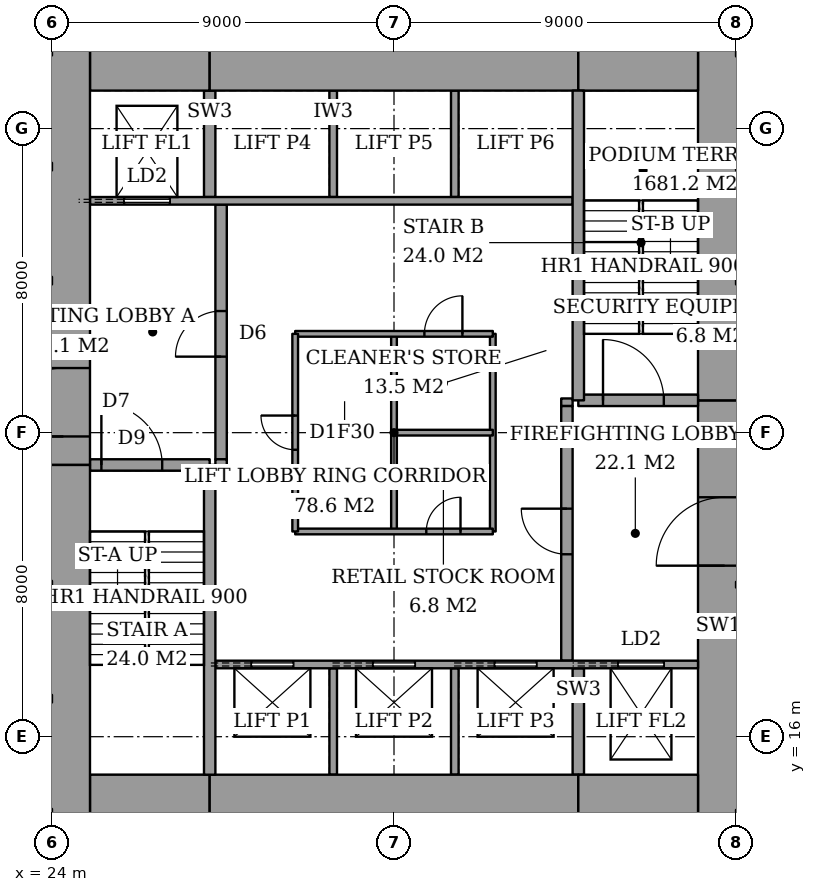
"""IFC4 building model, lengths in metres.
Left out: names, types, materials, properties, quantities, classifications, styles, units other than length and angle.
Written with IfcOpenShell. Run it as: python <this file> out.ifc"""

import sys

from ifc_helpers import new_model, si_unit, direction, frame, frame_2d, origin, place, context, subcontext, project, spatial, rectangle, extrude, element, fill, save


model = new_model("IFC4")
c1 = context("Model", 3, precision=1e-05, world=origin(), true_north=direction((0.0, 1.0)))
c2 = subcontext(c1, "Body", "Model", "MODEL_VIEW")
j1 = project(units=[si_unit("LENGTHUNIT", "METRE"), si_unit("PLANEANGLEUNIT", "RADIAN")], contexts=[c1])
p1 = place(None, origin())
s1 = spatial("IfcSite", under=j1, at=p1, CompositionType="ELEMENT")
p2 = place(p1, origin())
s2 = spatial("IfcBuilding", under=s1, at=p2, CompositionType="ELEMENT")
p3 = place(p2, frame((0.0, 0.0, 11.0)))
s3 = spatial("IfcBuildingStorey", under=s2, at=p3, CompositionType="ELEMENT", Elevation=11.0)
p4 = place(p3, frame((25.0, 14.0, 0.0), z_axis=(0.0, 0.0, 1.0), x_axis=(1.0, 0.0, 0.0)))
e1 = element("IfcWall", 1, at=p4, inside=s3, PredefinedType="SHEAR", context=c2, shape_type="SweptSolid", body=[
    extrude(rectangle(XDim=3.15, YDim=2.0, at=frame_2d((1.575, 0.0))), origin(), (0.0, 0.0, 1.0), 5.0),
])
p5 = place(p3, frame((28.15, 14.0, 0.0), z_axis=(0.0, 0.0, 1.0), x_axis=(1.0, 0.0, 0.0)))
e2 = element("IfcWall", 2, at=p5, inside=s3, PredefinedType="SHEAR", context=c2, shape_type="SweptSolid", body=[
    extrude(rectangle(XDim=9.7, YDim=2.0, at=frame_2d((4.85, 0.0))), origin(), (0.0, 0.0, 1.0), 5.0),
])
for number, where, z_axis, x_axis in (
    (3, (37.85, 14.0, 0.0), (0.0, 0.0, 1.0), (1.0, 0.0, 0.0)),
    (4, (25.0, 34.0, 0.0), (0.0, 0.0, 1.0), (1.0, 0.0, 0.0)),
):
    element("IfcWall", number, at=place(p3, frame(where, z_axis=z_axis, x_axis=x_axis)), inside=s3, PredefinedType="SHEAR", context=c2, shape_type="SweptSolid", body=[
        extrude(rectangle(XDim=3.15, YDim=2.0, at=frame_2d((1.575, 0.0))), origin(), (0.0, 0.0, 1.0), 5.0),
    ])
p6 = place(p3, frame((28.15, 34.0, 0.0), z_axis=(0.0, 0.0, 1.0), x_axis=(1.0, 0.0, 0.0)))
e5 = element("IfcWall", 5, at=p6, inside=s3, PredefinedType="SHEAR", context=c2, shape_type="SweptSolid", body=[
    extrude(rectangle(XDim=9.7, YDim=2.0, at=frame_2d((4.85, 0.0))), origin(), (0.0, 0.0, 1.0), 5.0),
])
p7 = place(p3, frame((37.85, 34.0, 0.0), z_axis=(0.0, 0.0, 1.0), x_axis=(1.0, 0.0, 0.0)))
e6 = element("IfcWall", 6, at=p7, inside=s3, PredefinedType="SHEAR", context=c2, shape_type="SweptSolid", body=[
    extrude(rectangle(XDim=3.15, YDim=2.0, at=frame_2d((1.575, 0.0))), origin(), (0.0, 0.0, 1.0), 5.0),
])
p8 = place(p3, frame((24.3, 13.0, 0.0), z_axis=(0.0, 0.0, 1.0), x_axis=(0.0, 1.0, 0.0)))
e7 = element("IfcWall", 7, at=p8, inside=s3, PredefinedType="SHEAR", context=c2, shape_type="SweptSolid", body=[
    extrude(rectangle(XDim=10.15, YDim=1.4, at=frame_2d((5.075, 0.0))), origin(), (0.0, 0.0, 1.0), 5.0),
])
p9 = place(p3, frame((24.3, 23.15, 0.0), z_axis=(0.0, 0.0, 1.0), x_axis=(0.0, 1.0, 0.0)))
e8 = element("IfcWall", 8, at=p9, inside=s3, PredefinedType="SHEAR", context=c2, shape_type="SweptSolid", body=[
    extrude(rectangle(XDim=11.85, YDim=1.4, at=frame_2d((5.925, 0.0))), origin(), (0.0, 0.0, 1.0), 5.0),
])
p10 = place(p9, frame((0.75, 0.0, 0.0)))
e9 = element("IfcOpeningElement", 9, at=p10, cuts=e8, PredefinedType="OPENING", context=c2, shape_type="SweptSolid", body=[
    extrude(rectangle(XDim=1.8, YDim=2.4, at=frame_2d((0.9, 1.2))), frame((0.0, 0.71, 0.0), z_axis=(0.0, -1.0, 0.0), x_axis=(1.0, 0.0, 0.0)), (0.0, 0.0, 1.0), 1.42),
])
p11 = place(p3, frame((41.7, 13.0, 0.0), z_axis=(0.0, 0.0, 1.0), x_axis=(0.0, 1.0, 0.0)))
e10 = element("IfcWall", 10, at=p11, inside=s3, PredefinedType="SHEAR", context=c2, shape_type="SweptSolid", body=[
    extrude(rectangle(XDim=11.85, YDim=1.4, at=frame_2d((5.925, 0.0))), origin(), (0.0, 0.0, 1.0), 5.0),
])
p12 = place(p11, frame((7.5, 0.0, 0.0)))
e11 = element("IfcOpeningElement", 11, at=p12, cuts=e10, PredefinedType="OPENING", context=c2, shape_type="SweptSolid", body=[
    extrude(rectangle(XDim=1.8, YDim=2.4, at=frame_2d((0.9, 1.2))), frame((0.0, 0.71, 0.0), z_axis=(0.0, -1.0, 0.0), x_axis=(1.0, 0.0, 0.0)), (0.0, 0.0, 1.0), 1.42),
])
p13 = place(p3, frame((41.7, 24.85, 0.0), z_axis=(0.0, 0.0, 1.0), x_axis=(0.0, 1.0, 0.0)))
e12 = element("IfcWall", 12, at=p13, inside=s3, PredefinedType="SHEAR", context=c2, shape_type="SweptSolid", body=[
    extrude(rectangle(XDim=10.15, YDim=1.4, at=frame_2d((5.075, 0.0))), origin(), (0.0, 0.0, 1.0), 5.0),
])
p14 = place(p3, frame((28.15, 15.0, 0.0), z_axis=(0.0, 0.0, 1.0), x_axis=(0.0, 1.0, 0.0)))
e13 = element("IfcWall", 13, at=p14, inside=s3, PredefinedType="SHEAR", context=c2, shape_type="SweptSolid", body=[
    extrude(rectangle(XDim=8.15, YDim=0.3, at=frame_2d((4.075, 0.0))), origin(), (0.0, 0.0, 1.0), 5.0),
])
p15 = place(p3, frame((25.0, 23.15, 0.0), z_axis=(0.0, 0.0, 1.0), x_axis=(1.0, 0.0, 0.0)))
e14 = element("IfcWall", 14, at=p15, inside=s3, PredefinedType="SHEAR", context=c2, shape_type="SweptSolid", body=[
    extrude(rectangle(XDim=3.15, YDim=0.3, at=frame_2d((1.575, 0.0))), origin(), (0.0, 0.0, 1.0), 5.0),
])
p16 = place(p15, frame((0.3, 0.0, 0.0)))
e15 = element("IfcOpeningElement", 15, at=p16, cuts=e14, PredefinedType="OPENING", context=c2, shape_type="SweptSolid", body=[
    extrude(rectangle(XDim=1.6, YDim=2.1, at=frame_2d((0.8, 1.05))), frame((0.0, 0.16, 0.0), z_axis=(0.0, -1.0, 0.0), x_axis=(1.0, 0.0, 0.0)), (0.0, 0.0, 1.0), 0.32),
])
p17 = place(p3, frame((37.85, 24.85, 0.0), z_axis=(0.0, 0.0, 1.0), x_axis=(0.0, 1.0, 0.0)))
e16 = element("IfcWall", 16, at=p17, inside=s3, PredefinedType="SHEAR", context=c2, shape_type="SweptSolid", body=[
    extrude(rectangle(XDim=8.15, YDim=0.3, at=frame_2d((4.075, 0.0))), origin(), (0.0, 0.0, 1.0), 5.0),
])
p18 = place(p3, frame((37.85, 24.85, 0.0), z_axis=(0.0, 0.0, 1.0), x_axis=(1.0, 0.0, 0.0)))
e17 = element("IfcWall", 17, at=p18, inside=s3, PredefinedType="SHEAR", context=c2, shape_type="SweptSolid", body=[
    extrude(rectangle(XDim=3.15, YDim=0.3, at=frame_2d((1.575, 0.0))), origin(), (0.0, 0.0, 1.0), 5.0),
])
p19 = place(p18, frame((0.65, 0.0, 0.0)))
e18 = element("IfcOpeningElement", 18, at=p19, cuts=e17, PredefinedType="OPENING", context=c2, shape_type="SweptSolid", body=[
    extrude(rectangle(XDim=1.6, YDim=2.1, at=frame_2d((0.8, 1.05))), frame((0.0, 0.16, 0.0), z_axis=(0.0, -1.0, 0.0), x_axis=(1.0, 0.0, 0.0)), (0.0, 0.0, 1.0), 0.32),
])
p20 = place(p3, frame((28.45, 23.3, 0.0), z_axis=(0.0, 0.0, 1.0), x_axis=(0.0, 1.0, 0.0)))
e19 = element("IfcWall", 19, at=p20, inside=s3, PredefinedType="PARTITIONING", context=c2, shape_type="SweptSolid", body=[
    extrude(rectangle(XDim=6.7, YDim=0.3, at=frame_2d((3.35, 0.0))), origin(), (0.0, 0.0, 1.0), 5.0),
])
p21 = place(p20, frame((2.7, 0.0, 0.0)))
e20 = element("IfcOpeningElement", 20, at=p21, cuts=e19, PredefinedType="OPENING", context=c2, shape_type="SweptSolid", body=[
    extrude(rectangle(XDim=1.2, YDim=2.1, at=frame_2d((0.6, 1.05))), frame((0.0, 0.16, 0.0), z_axis=(0.0, -1.0, 0.0), x_axis=(1.0, 0.0, 0.0)), (0.0, 0.0, 1.0), 0.32),
])
p22 = place(p3, frame((37.55, 18.0, 0.0), z_axis=(0.0, 0.0, 1.0), x_axis=(0.0, 1.0, 0.0)))
e21 = element("IfcWall", 21, at=p22, inside=s3, PredefinedType="PARTITIONING", context=c2, shape_type="SweptSolid", body=[
    extrude(rectangle(XDim=6.7, YDim=0.3, at=frame_2d((3.35, 0.0))), origin(), (0.0, 0.0, 1.0), 5.0),
])
p23 = place(p22, frame((2.8, 0.0, 0.0)))
e22 = element("IfcOpeningElement", 22, at=p23, cuts=e21, PredefinedType="OPENING", context=c2, shape_type="SweptSolid", body=[
    extrude(rectangle(XDim=1.2, YDim=2.1, at=frame_2d((0.6, 1.05))), frame((0.0, 0.16, 0.0), z_axis=(0.0, -1.0, 0.0), x_axis=(1.0, 0.0, 0.0)), (0.0, 0.0, 1.0), 0.32),
])
p24 = place(p3, frame((28.3, 17.9, 0.0), z_axis=(0.0, 0.0, 1.0), x_axis=(1.0, 0.0, 0.0)))
e23 = element("IfcWall", 23, at=p24, inside=s3, PredefinedType="PARTITIONING", context=c2, shape_type="SweptSolid", body=[
    extrude(rectangle(XDim=12.7, YDim=0.2, at=frame_2d((6.35, 0.0))), origin(), (0.0, 0.0, 1.0), 5.0),
])
p25 = place(p24, frame((0.95, 0.0, 0.0)))
e24 = element("IfcOpeningElement", 24, at=p25, cuts=e23, PredefinedType="OPENING", context=c2, shape_type="SweptSolid", body=[
    extrude(rectangle(XDim=1.1, YDim=2.1, at=frame_2d((0.55, 1.05))), frame((0.0, 0.11, 0.0), z_axis=(0.0, -1.0, 0.0), x_axis=(1.0, 0.0, 0.0)), (0.0, 0.0, 1.0), 0.22),
])
p26 = place(p24, frame((4.15, 0.0, 0.0)))
e25 = element("IfcOpeningElement", 25, at=p26, cuts=e23, PredefinedType="OPENING", context=c2, shape_type="SweptSolid", body=[
    extrude(rectangle(XDim=1.1, YDim=2.1, at=frame_2d((0.55, 1.05))), frame((0.0, 0.11, 0.0), z_axis=(0.0, -1.0, 0.0), x_axis=(1.0, 0.0, 0.0)), (0.0, 0.0, 1.0), 0.22),
])
p27 = place(p24, frame((7.35, 0.0, 0.0)))
e26 = element("IfcOpeningElement", 26, at=p27, cuts=e23, PredefinedType="OPENING", context=c2, shape_type="SweptSolid", body=[
    extrude(rectangle(XDim=1.1, YDim=2.1, at=frame_2d((0.55, 1.05))), frame((0.0, 0.11, 0.0), z_axis=(0.0, -1.0, 0.0), x_axis=(1.0, 0.0, 0.0)), (0.0, 0.0, 1.0), 0.22),
])
p28 = place(p24, frame((10.6, 0.0, 0.0)))
e27 = element("IfcOpeningElement", 27, at=p28, cuts=e23, PredefinedType="OPENING", context=c2, shape_type="SweptSolid", body=[
    extrude(rectangle(XDim=1.2, YDim=2.1, at=frame_2d((0.6, 1.05))), frame((0.0, 0.11, 0.0), z_axis=(0.0, -1.0, 0.0), x_axis=(1.0, 0.0, 0.0)), (0.0, 0.0, 1.0), 0.22),
])
p29 = place(p3, frame((25.0, 30.1, 0.0), z_axis=(0.0, 0.0, 1.0), x_axis=(1.0, 0.0, 0.0)))
e28 = element("IfcWall", 28, at=p29, inside=s3, PredefinedType="PARTITIONING", context=c2, shape_type="SweptSolid", body=[
    extrude(rectangle(XDim=12.7, YDim=0.2, at=frame_2d((6.35, 0.0))), origin(), (0.0, 0.0, 1.0), 5.0),
])
p30 = place(p29, frame((0.9, 0.0, 0.0)))
e29 = element("IfcOpeningElement", 29, at=p30, cuts=e28, PredefinedType="OPENING", context=c2, shape_type="SweptSolid", body=[
    extrude(rectangle(XDim=1.2, YDim=2.1, at=frame_2d((0.6, 1.05))), frame((0.0, 0.11, 0.0), z_axis=(0.0, -1.0, 0.0), x_axis=(1.0, 0.0, 0.0)), (0.0, 0.0, 1.0), 0.22),
])
for number, where, z_axis, x_axis in (
    (30, (31.4, 15.0, 0.0), (0.0, 0.0, 1.0), (0.0, 1.0, 0.0)),
    (31, (34.6, 15.0, 0.0), (0.0, 0.0, 1.0), (0.0, 1.0, 0.0)),
):
    element("IfcWall", number, at=place(p3, frame(where, z_axis=z_axis, x_axis=x_axis)), inside=s3, PredefinedType="PARTITIONING", context=c2, shape_type="SweptSolid", body=[
        extrude(rectangle(XDim=2.8, YDim=0.2, at=frame_2d((1.4, 0.0))), origin(), (0.0, 0.0, 1.0), 5.0),
    ])
p31 = place(p3, frame((37.85, 15.0, 0.0), z_axis=(0.0, 0.0, 1.0), x_axis=(0.0, 1.0, 0.0)))
e32 = element("IfcWall", 32, at=p31, inside=s3, PredefinedType="SHEAR", context=c2, shape_type="SweptSolid", body=[
    extrude(rectangle(XDim=2.8, YDim=0.3, at=frame_2d((1.4, 0.0))), origin(), (0.0, 0.0, 1.0), 5.0),
])
for number, where, z_axis, x_axis in (
    (33, (31.4, 30.2, 0.0), (0.0, 0.0, 1.0), (0.0, 1.0, 0.0)),
    (34, (34.6, 30.2, 0.0), (0.0, 0.0, 1.0), (0.0, 1.0, 0.0)),
):
    element("IfcWall", number, at=place(p3, frame(where, z_axis=z_axis, x_axis=x_axis)), inside=s3, PredefinedType="PARTITIONING", context=c2, shape_type="SweptSolid", body=[
        extrude(rectangle(XDim=2.8, YDim=0.2, at=frame_2d((1.4, 0.0))), origin(), (0.0, 0.0, 1.0), 5.0),
    ])
p32 = place(p3, frame((28.15, 30.2, 0.0), z_axis=(0.0, 0.0, 1.0), x_axis=(0.0, 1.0, 0.0)))
e35 = element("IfcWall", 35, at=p32, inside=s3, PredefinedType="SHEAR", context=c2, shape_type="SweptSolid", body=[
    extrude(rectangle(XDim=2.8, YDim=0.3, at=frame_2d((1.4, 0.0))), origin(), (0.0, 0.0, 1.0), 5.0),
])
for number, where, z_axis, x_axis in (
    (36, (28.3, 23.2, 0.0), (0.0, 0.0, 1.0), (1.0, 0.0, 0.0)),
    (37, (37.4, 24.8, 0.0), (0.0, 0.0, 1.0), (1.0, 0.0, 0.0)),
):
    element("IfcWall", number, at=place(p3, frame(where, z_axis=z_axis, x_axis=x_axis)), inside=s3, PredefinedType="PARTITIONING", context=c2, shape_type="SweptSolid", body=[
        extrude(rectangle(XDim=0.3, YDim=0.2, at=frame_2d((0.15, 0.0))), origin(), (0.0, 0.0, 1.0), 5.0),
    ])
p33 = place(p3, frame((30.4, 21.4, 0.0), z_axis=(0.0, 0.0, 1.0), x_axis=(1.0, 0.0, 0.0)))
e38 = element("IfcWall", 38, at=p33, inside=s3, PredefinedType="PARTITIONING", context=c2, shape_type="SweptSolid", body=[
    extrude(rectangle(XDim=5.2, YDim=0.15, at=frame_2d((2.6, 0.0))), origin(), (0.0, 0.0, 1.0), 4.7),
])
p34 = place(p33, frame((3.45, 0.0, 0.0)))
e39 = element("IfcOpeningElement", 39, at=p34, cuts=e38, PredefinedType="OPENING", context=c2, shape_type="SweptSolid", body=[
    extrude(rectangle(XDim=0.9, YDim=2.1, at=frame_2d((0.45, 1.05))), frame((0.0, 0.085, 0.0), z_axis=(0.0, -1.0, 0.0), x_axis=(1.0, 0.0, 0.0)), (0.0, 0.0, 1.0), 0.17),
])
p35 = place(p3, frame((30.4, 26.6, 0.0), z_axis=(0.0, 0.0, 1.0), x_axis=(1.0, 0.0, 0.0)))
e40 = element("IfcWall", 40, at=p35, inside=s3, PredefinedType="PARTITIONING", context=c2, shape_type="SweptSolid", body=[
    extrude(rectangle(XDim=5.2, YDim=0.15, at=frame_2d((2.6, 0.0))), origin(), (0.0, 0.0, 1.0), 4.7),
])
p36 = place(p35, frame((3.4, 0.0, 0.0)))
e41 = element("IfcOpeningElement", 41, at=p36, cuts=e40, PredefinedType="OPENING", context=c2, shape_type="SweptSolid", body=[
    extrude(rectangle(XDim=1.0, YDim=2.1, at=frame_2d((0.5, 1.05))), frame((0.0, 0.085, 0.0), z_axis=(0.0, -1.0, 0.0), x_axis=(1.0, 0.0, 0.0)), (0.0, 0.0, 1.0), 0.17),
])
p37 = place(p3, frame((30.4, 21.4, 0.0), z_axis=(0.0, 0.0, 1.0), x_axis=(0.0, 1.0, 0.0)))
e42 = element("IfcWall", 42, at=p37, inside=s3, PredefinedType="PARTITIONING", context=c2, shape_type="SweptSolid", body=[
    extrude(rectangle(XDim=5.2, YDim=0.15, at=frame_2d((2.6, 0.0))), origin(), (0.0, 0.0, 1.0), 4.7),
])
p38 = place(p37, frame((2.15, 0.0, 0.0)))
e43 = element("IfcOpeningElement", 43, at=p38, cuts=e42, PredefinedType="OPENING", context=c2, shape_type="SweptSolid", body=[
    extrude(rectangle(XDim=0.9, YDim=2.1, at=frame_2d((0.45, 1.05))), frame((0.0, 0.085, 0.0), z_axis=(0.0, -1.0, 0.0), x_axis=(1.0, 0.0, 0.0)), (0.0, 0.0, 1.0), 0.17),
])
p39 = place(p3, frame((35.6, 21.4, 0.0), z_axis=(0.0, 0.0, 1.0), x_axis=(0.0, 1.0, 0.0)))
e44 = element("IfcWall", 44, at=p39, inside=s3, PredefinedType="PARTITIONING", context=c2, shape_type="SweptSolid", body=[
    extrude(rectangle(XDim=5.2, YDim=0.15, at=frame_2d((2.6, 0.0))), origin(), (0.0, 0.0, 1.0), 4.7),
])
p40 = place(p3, frame((33.0, 24.0, 0.0), z_axis=(0.0, 0.0, 1.0), x_axis=(1.0, 0.0, 0.0)))
e45 = element("IfcWall", 45, at=p40, inside=s3, PredefinedType="PARTITIONING", context=c2, shape_type="SweptSolid", body=[
    extrude(rectangle(XDim=2.6, YDim=0.15, at=frame_2d((1.3, 0.0))), origin(), (0.0, 0.0, 1.0), 4.7),
])
p41 = place(p3, frame((33.0, 21.4, 0.0), z_axis=(0.0, 0.0, 1.0), x_axis=(0.0, 1.0, 0.0)))
e46 = element("IfcWall", 46, at=p41, inside=s3, PredefinedType="PARTITIONING", context=c2, shape_type="SweptSolid", body=[
    extrude(rectangle(XDim=5.2, YDim=0.15, at=frame_2d((2.6, 0.0))), origin(), (0.0, 0.0, 1.0), 4.7),
])
p42 = place(p16, origin())
e47 = element("IfcDoor", 47, at=p42, inside=s3, OperationType="DOUBLE_DOOR_SINGLE_SWING", PredefinedType="DOOR", context=c2, shape_type="SweptSolid", body=[
    extrude(rectangle(XDim=1.6, YDim=2.1, at=frame_2d((0.8, 1.05))), frame((0.0, 0.025, 0.0), z_axis=(0.0, -1.0, 0.0), x_axis=(1.0, 0.0, 0.0)), (0.0, 0.0, 1.0), 0.05),
])
fill(e15, e47)
p43 = place(p19, origin())
e48 = element("IfcDoor", 48, at=p43, inside=s3, OperationType="DOUBLE_DOOR_SINGLE_SWING", PredefinedType="DOOR", context=c2, shape_type="SweptSolid", body=[
    extrude(rectangle(XDim=1.6, YDim=2.1, at=frame_2d((0.8, 1.05))), frame((0.0, 0.025, 0.0), z_axis=(0.0, -1.0, 0.0), x_axis=(1.0, 0.0, 0.0)), (0.0, 0.0, 1.0), 0.05),
])
fill(e18, e48)
p44 = place(p21, origin())
e49 = element("IfcDoor", 49, at=p44, inside=s3, OperationType="SINGLE_SWING_RIGHT", PredefinedType="DOOR", context=c2, shape_type="SweptSolid", body=[
    extrude(rectangle(XDim=1.2, YDim=2.1, at=frame_2d((0.6, 1.05))), frame((0.0, 0.025, 0.0), z_axis=(0.0, -1.0, 0.0), x_axis=(1.0, 0.0, 0.0)), (0.0, 0.0, 1.0), 0.05),
])
fill(e20, e49)
p45 = place(p23, origin())
e50 = element("IfcDoor", 50, at=p45, inside=s3, OperationType="SINGLE_SWING_LEFT", PredefinedType="DOOR", context=c2, shape_type="SweptSolid", body=[
    extrude(rectangle(XDim=1.2, YDim=2.1, at=frame_2d((0.6, 1.05))), frame((0.0, 0.025, 0.0), z_axis=(0.0, -1.0, 0.0), x_axis=(1.0, 0.0, 0.0)), (0.0, 0.0, 1.0), 0.05),
])
fill(e22, e50)
p46 = place(p10, origin())
e51 = element("IfcDoor", 51, at=p46, inside=s3, OperationType="DOUBLE_DOOR_DOUBLE_SWING", PredefinedType="DOOR", context=c2, shape_type="SweptSolid", body=[
    extrude(rectangle(XDim=1.8, YDim=2.4, at=frame_2d((0.9, 1.2))), frame((0.0, 0.025, 0.0), z_axis=(0.0, -1.0, 0.0), x_axis=(1.0, 0.0, 0.0)), (0.0, 0.0, 1.0), 0.05),
])
fill(e9, e51)
p47 = place(p12, origin())
e52 = element("IfcDoor", 52, at=p47, inside=s3, OperationType="DOUBLE_DOOR_DOUBLE_SWING", PredefinedType="DOOR", context=c2, shape_type="SweptSolid", body=[
    extrude(rectangle(XDim=1.8, YDim=2.4, at=frame_2d((0.9, 1.2))), frame((0.0, 0.025, 0.0), z_axis=(0.0, -1.0, 0.0), x_axis=(1.0, 0.0, 0.0)), (0.0, 0.0, 1.0), 0.05),
])
fill(e11, e52)
p48 = place(p38, origin())
e53 = element("IfcDoor", 53, at=p48, inside=s3, OperationType="SINGLE_SWING_LEFT", PredefinedType="DOOR", context=c2, shape_type="SweptSolid", body=[
    extrude(rectangle(XDim=0.9, YDim=2.1, at=frame_2d((0.45, 1.05))), frame((0.0, 0.025, 0.0), z_axis=(0.0, -1.0, 0.0), x_axis=(1.0, 0.0, 0.0)), (0.0, 0.0, 1.0), 0.05),
])
fill(e43, e53)
p49 = place(p34, origin())
e54 = element("IfcDoor", 54, at=p49, inside=s3, OperationType="SINGLE_SWING_LEFT", PredefinedType="DOOR", context=c2, shape_type="SweptSolid", body=[
    extrude(rectangle(XDim=0.9, YDim=2.1, at=frame_2d((0.45, 1.05))), frame((0.0, 0.025, 0.0), z_axis=(0.0, -1.0, 0.0), x_axis=(1.0, 0.0, 0.0)), (0.0, 0.0, 1.0), 0.05),
])
fill(e39, e54)
p50 = place(p36, origin())
e55 = element("IfcDoor", 55, at=p50, inside=s3, OperationType="SINGLE_SWING_LEFT", PredefinedType="DOOR", context=c2, shape_type="SweptSolid", body=[
    extrude(rectangle(XDim=1.0, YDim=2.1, at=frame_2d((0.5, 1.05))), frame((0.0, 0.025, 0.0), z_axis=(0.0, -1.0, 0.0), x_axis=(1.0, 0.0, 0.0)), (0.0, 0.0, 1.0), 0.05),
])
fill(e41, e55)
p51 = place(p25, origin())
e56 = element("IfcDoor", 56, at=p51, inside=s3, OperationType="SLIDING_TO_LEFT", PredefinedType="DOOR", context=c2, shape_type="SweptSolid", body=[
    extrude(rectangle(XDim=1.1, YDim=2.1, at=frame_2d((0.55, 1.05))), frame((0.0, 0.025, 0.0), z_axis=(0.0, -1.0, 0.0), x_axis=(1.0, 0.0, 0.0)), (0.0, 0.0, 1.0), 0.05),
])
fill(e24, e56)
p52 = place(p26, origin())
e57 = element("IfcDoor", 57, at=p52, inside=s3, OperationType="SLIDING_TO_LEFT", PredefinedType="DOOR", context=c2, shape_type="SweptSolid", body=[
    extrude(rectangle(XDim=1.1, YDim=2.1, at=frame_2d((0.55, 1.05))), frame((0.0, 0.025, 0.0), z_axis=(0.0, -1.0, 0.0), x_axis=(1.0, 0.0, 0.0)), (0.0, 0.0, 1.0), 0.05),
])
fill(e25, e57)
p53 = place(p27, origin())
e58 = element("IfcDoor", 58, at=p53, inside=s3, OperationType="SLIDING_TO_LEFT", PredefinedType="DOOR", context=c2, shape_type="SweptSolid", body=[
    extrude(rectangle(XDim=1.1, YDim=2.1, at=frame_2d((0.55, 1.05))), frame((0.0, 0.025, 0.0), z_axis=(0.0, -1.0, 0.0), x_axis=(1.0, 0.0, 0.0)), (0.0, 0.0, 1.0), 0.05),
])
fill(e26, e58)
p54 = place(p30, origin())
e59 = element("IfcDoor", 59, at=p54, inside=s3, OperationType="SLIDING_TO_LEFT", PredefinedType="DOOR", context=c2, shape_type="SweptSolid", body=[
    extrude(rectangle(XDim=1.2, YDim=2.1, at=frame_2d((0.6, 1.05))), frame((0.0, 0.025, 0.0), z_axis=(0.0, -1.0, 0.0), x_axis=(1.0, 0.0, 0.0)), (0.0, 0.0, 1.0), 0.05),
])
fill(e29, e59)
p55 = place(p28, origin())
e60 = element("IfcDoor", 60, at=p55, inside=s3, OperationType="SLIDING_TO_LEFT", PredefinedType="DOOR", context=c2, shape_type="SweptSolid", body=[
    extrude(rectangle(XDim=1.2, YDim=2.1, at=frame_2d((0.6, 1.05))), frame((0.0, 0.025, 0.0), z_axis=(0.0, -1.0, 0.0), x_axis=(1.0, 0.0, 0.0)), (0.0, 0.0, 1.0), 0.05),
])
fill(e27, e60)
save(model, sys.argv[1])
